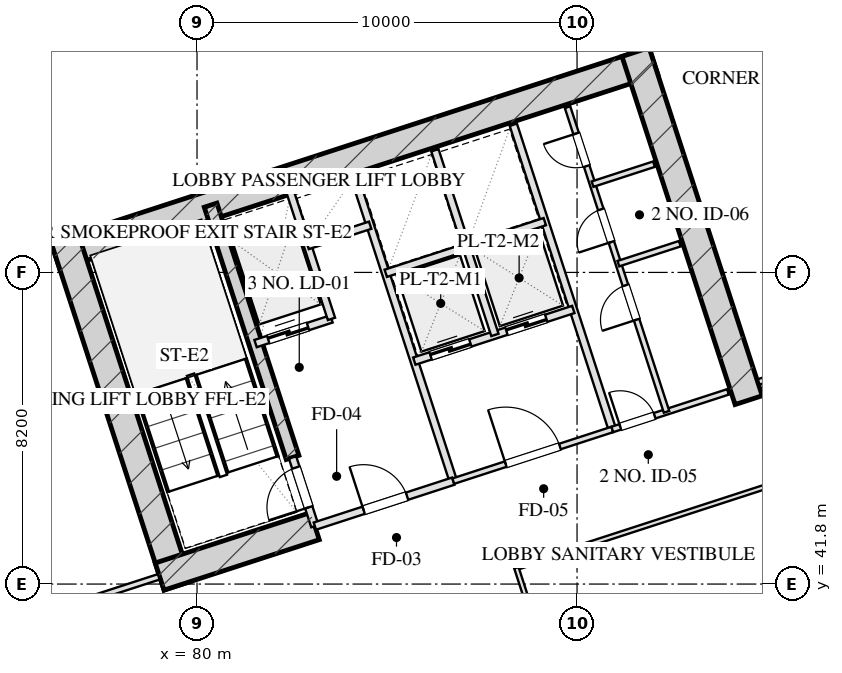
"""IFC4 building model, lengths in metres.
Left out: names, types, materials, properties, quantities, classifications, styles, units other than length and angle.
Written with IfcOpenShell. Run it as: python <this file> out.ifc"""

import sys

from ifc_helpers import new_model, si_unit, direction, frame, frame_2d, origin, place, context, subcontext, project, spatial, rectangle, extrude, element, fill, save


model = new_model("IFC4")
c1 = context("Model", 3, precision=1e-05, world=origin(), true_north=direction((0.0, 1.0)))
c2 = subcontext(c1, "Body", "Model", "MODEL_VIEW")
j1 = project(units=[si_unit("LENGTHUNIT", "METRE"), si_unit("PLANEANGLEUNIT", "RADIAN")], contexts=[c1])
p1 = place(None, origin())
s1 = spatial("IfcSite", under=j1, at=p1, CompositionType="ELEMENT")
p2 = place(p1, origin())
s2 = spatial("IfcBuilding", under=s1, at=p2, CompositionType="ELEMENT")
p3 = place(p2, frame((0.0, 0.0, 60.95)))
s3 = spatial("IfcBuildingStorey", under=s2, at=p3, CompositionType="ELEMENT", Elevation=60.95)
p4 = place(p3, frame((76.272, 50.443, 0.0), z_axis=(0.0, 0.0, 1.0), x_axis=(0.951056072937, 0.309018358888, 0.0)))
e1 = element("IfcWall", 1, at=p4, inside=s3, PredefinedType="SHEAR", context=c2, shape_type="SweptSolid", body=[
    extrude(rectangle(XDim=16.55, YDim=0.75, at=frame_2d((8.275, 0.0))), origin(), (0.0, 0.0, 1.0), 3.45),
])
for number, where, z_axis, x_axis in (
    (2, (79.489, 41.756, 0.0), (0.0, 0.0, 1.0), (-0.309, 0.951, 0.0)),
    (3, (94.515, 46.639, 0.0), (0.0, 0.0, 1.0), (-0.309, 0.951, 0.0)),
):
    element("IfcWall", number, at=place(p3, frame(where, z_axis=z_axis, x_axis=x_axis)), inside=s3, PredefinedType="SHEAR", context=c2, shape_type="SweptSolid", body=[
        extrude(rectangle(XDim=9.63, YDim=0.75, at=frame_2d((4.815, 0.0))), origin(), (0.0, 0.0, 1.0), 3.45),
    ])
p5 = place(p3, frame((82.514, 45.131, 0.0), z_axis=(0.0, 0.0, 1.0), x_axis=(-0.308988790936, 0.951065679686, 0.0)))
e4 = element("IfcWall", 4, at=p5, inside=s3, PredefinedType="SHEAR", context=c2, shape_type="SweptSolid", body=[
    extrude(rectangle(XDim=6.98, YDim=0.35, at=frame_2d((3.49, 0.0))), origin(), (0.0, 0.0, 1.0), 3.45),
])
p6 = place(p3, frame((79.016, 41.997, 0.0), z_axis=(0.0, 0.0, 1.0), x_axis=(0.95106038264, 0.309005094736, 0.0)))
e5 = element("IfcWall", 5, at=p6, inside=s3, PredefinedType="SHEAR", context=c2, shape_type="SweptSolid", body=[
    extrude(rectangle(XDim=4.295, YDim=0.75, at=frame_2d((2.147, 0.0))), origin(), (0.0, 0.0, 1.0), 3.45),
])
p7 = place(p3, frame((79.655, 4.352, 0.0), z_axis=(0.0, 0.0, 1.0), x_axis=(-0.309014526607, 0.951057318118, 0.0)))
e6 = element("IfcWall", 6, at=p7, inside=s3, PredefinedType="SOLIDWALL", context=c2, shape_type="SweptSolid", body=[
    extrude(rectangle(XDim=50.0, YDim=0.4, at=frame_2d((25.0, 0.0))), origin(), (0.0, 0.0, 1.0), 2.61),
])
p8 = place(p7, frame((30.15, 0.0, 0.75)))
e7 = element("IfcOpeningElement", 7, at=p8, cuts=e6, PredefinedType="OPENING", context=c2, shape_type="SweptSolid", body=[
    extrude(rectangle(XDim=2.5, YDim=1.46, at=frame_2d((1.25, 0.73))), frame((0.0, 0.21, 0.0), z_axis=(0.0, -1.0, 0.0), x_axis=(1.0, 0.0, 0.0)), (0.0, 0.0, 1.0), 0.42),
])
p9 = place(p7, frame((18.65, 0.0, 0.0)))
e8 = element("IfcOpeningElement", 8, at=p9, cuts=e6, PredefinedType="OPENING", context=c2, shape_type="SweptSolid", body=[
    extrude(rectangle(XDim=1.1, YDim=2.15, at=frame_2d((0.55, 1.075))), frame((0.0, 0.21, 0.0), z_axis=(0.0, -1.0, 0.0), x_axis=(1.0, 0.0, 0.0)), (0.0, 0.0, 1.0), 0.42),
])
p10 = place(p3, frame((66.002, 55.433, 0.0), z_axis=(0.0, 0.0, 1.0), x_axis=(0.951055939317, 0.309018770125, 0.0)))
e9 = element("IfcWall", 9, at=p10, inside=s3, PredefinedType="SOLIDWALL", context=c2, shape_type="SweptSolid", body=[
    extrude(rectangle(XDim=32.4, YDim=0.4, at=frame_2d((16.2, 0.0))), origin(), (0.0, 0.0, 1.0), 2.61),
])
p11 = place(p3, frame((83.101, 43.324, 0.0), z_axis=(0.0, 0.0, 1.0), x_axis=(-0.309048298632, 0.951046344356, 0.0)))
e10 = element("IfcWall", 10, at=p11, inside=s3, PredefinedType="PARTITIONING", context=c2, shape_type="SweptSolid", body=[
    extrude(rectangle(XDim=1.9, YDim=0.2, at=frame_2d((0.95, 0.0))), origin(), (0.0, 0.0, 1.0), 3.175),
])
p12 = place(p11, frame((0.52, 0.0, 0.0)))
e11 = element("IfcOpeningElement", 11, at=p12, cuts=e10, PredefinedType="OPENING", context=c2, shape_type="SweptSolid", body=[
    extrude(rectangle(XDim=1.1, YDim=2.05, at=frame_2d((0.55, 1.025))), frame((0.0, 0.11, 0.0), z_axis=(0.0, -1.0, 0.0), x_axis=(1.0, 0.0, 0.0)), (0.0, 0.0, 1.0), 0.22),
])
p13 = place(p3, frame((86.743, 44.508, 0.0), z_axis=(0.0, 0.0, 1.0), x_axis=(-0.309016001439, 0.951056838919, 0.0)))
e12 = element("IfcWall", 12, at=p13, inside=s3, PredefinedType="PARTITIONING", context=c2, shape_type="SweptSolid", body=[
    extrude(rectangle(XDim=8.43, YDim=0.2, at=frame_2d((4.215, 0.0))), origin(), (0.0, 0.0, 1.0), 3.175),
])
p14 = place(p3, frame((83.101, 43.324, 0.0), z_axis=(0.0, 0.0, 1.0), x_axis=(0.951052804469, 0.309028417967, 0.0)))
e13 = element("IfcWall", 13, at=p14, inside=s3, PredefinedType="PARTITIONING", context=c2, shape_type="SweptSolid", body=[
    extrude(rectangle(XDim=3.83, YDim=0.2, at=frame_2d((1.915, 0.0))), origin(), (0.0, 0.0, 1.0), 3.175),
])
p15 = place(p14, frame((1.35, 0.0, 0.0)))
e14 = element("IfcOpeningElement", 14, at=p15, cuts=e13, PredefinedType="OPENING", context=c2, shape_type="SweptSolid", body=[
    extrude(rectangle(XDim=1.2, YDim=2.05, at=frame_2d((0.6, 1.025))), frame((0.0, 0.11, 0.0), z_axis=(0.0, -1.0, 0.0), x_axis=(1.0, 0.0, 0.0)), (0.0, 0.0, 1.0), 0.22),
])
p16 = place(p3, frame((81.54, 48.127, 0.0), z_axis=(0.0, 0.0, 1.0), x_axis=(0.951062257173, 0.308999325213, 0.0)))
e15 = element("IfcWall", 15, at=p16, inside=s3, PredefinedType="PARTITIONING", context=c2, shape_type="SweptSolid", body=[
    extrude(rectangle(XDim=2.1, YDim=0.2, at=frame_2d((1.05, 0.0))), origin(), (0.0, 0.0, 1.0), 3.175),
])
p17 = place(p16, frame((0.35, 0.0, 0.0)))
e16 = element("IfcOpeningElement", 16, at=p17, cuts=e15, PredefinedType="OPENING", context=c2, shape_type="SweptSolid", body=[
    extrude(rectangle(XDim=1.1, YDim=2.05, at=frame_2d((0.55, 1.025))), frame((0.0, 0.11, 0.0), z_axis=(0.0, -1.0, 0.0), x_axis=(1.0, 0.0, 0.0)), (0.0, 0.0, 1.0), 0.22),
])
p18 = place(p3, frame((83.538, 48.776, 0.0), z_axis=(0.0, 0.0, 1.0), x_axis=(-0.3089935693, 0.951064127245, 0.0)))
e17 = element("IfcWall", 17, at=p18, inside=s3, PredefinedType="PARTITIONING", context=c2, shape_type="SweptSolid", body=[
    extrude(rectangle(XDim=3.7, YDim=0.2, at=frame_2d((1.85, 0.0))), origin(), (0.0, 0.0, 1.0), 3.175),
])
p19 = place(p3, frame((82.91, 50.707, 0.0), z_axis=(0.0, 0.0, 1.0), x_axis=(0.951041328149, 0.309063734775, 0.0)))
e18 = element("IfcWall", 18, at=p19, inside=s3, PredefinedType="PARTITIONING", context=c2, shape_type="SweptSolid", body=[
    extrude(rectangle(XDim=1.73, YDim=0.2, at=frame_2d((0.865, 0.0))), origin(), (0.0, 0.0, 1.0), 3.175),
])
p20 = place(p3, frame((90.928, 45.868, 0.0), z_axis=(0.0, 0.0, 1.0), x_axis=(-0.309042196757, 0.951048327176, 0.0)))
e19 = element("IfcWall", 19, at=p20, inside=s3, PredefinedType="PARTITIONING", context=c2, shape_type="SweptSolid", body=[
    extrude(rectangle(XDim=8.43, YDim=0.2, at=frame_2d((4.215, 0.0))), origin(), (0.0, 0.0, 1.0), 3.175),
])
p21 = place(p3, frame((86.743, 44.508, 0.0), z_axis=(0.0, 0.0, 1.0), x_axis=(0.951063829732, 0.308994485023, 0.0)))
e20 = element("IfcWall", 20, at=p21, inside=s3, PredefinedType="PARTITIONING", context=c2, shape_type="SweptSolid", body=[
    extrude(rectangle(XDim=4.4, YDim=0.15, at=frame_2d((2.2, 0.0))), origin(), (0.0, 0.0, 1.0), 3.175),
])
p22 = place(p21, frame((1.45, 0.0, 0.0)))
e21 = element("IfcOpeningElement", 21, at=p22, cuts=e20, PredefinedType="OPENING", context=c2, shape_type="SweptSolid", body=[
    extrude(rectangle(XDim=1.5, YDim=2.05, at=frame_2d((0.75, 1.025))), frame((0.0, 0.085, 0.0), z_axis=(0.0, -1.0, 0.0), x_axis=(1.0, 0.0, 0.0)), (0.0, 0.0, 1.0), 0.17),
])
p23 = place(p3, frame((85.718, 47.666, 0.0), z_axis=(0.0, 0.0, 1.0), x_axis=(0.951058531764, 0.30901079133, 0.0)))
e22 = element("IfcWall", 22, at=p23, inside=s3, PredefinedType="PARTITIONING", context=c2, shape_type="SweptSolid", body=[
    extrude(rectangle(XDim=4.4, YDim=0.2, at=frame_2d((2.2, 0.0))), origin(), (0.0, 0.0, 1.0), 3.175),
])
p24 = place(p23, frame((0.45, 0.0, 0.0)))
e23 = element("IfcOpeningElement", 23, at=p24, cuts=e22, PredefinedType="OPENING", context=c2, shape_type="SweptSolid", body=[
    extrude(rectangle(XDim=1.1, YDim=2.05, at=frame_2d((0.55, 1.025))), frame((0.0, 0.11, 0.0), z_axis=(0.0, -1.0, 0.0), x_axis=(1.0, 0.0, 0.0)), (0.0, 0.0, 1.0), 0.22),
])
p25 = place(p23, frame((2.55, 0.0, 0.0)))
e24 = element("IfcOpeningElement", 24, at=p25, cuts=e22, PredefinedType="OPENING", context=c2, shape_type="SweptSolid", body=[
    extrude(rectangle(XDim=1.1, YDim=2.05, at=frame_2d((0.55, 1.025))), frame((0.0, 0.11, 0.0), z_axis=(0.0, -1.0, 0.0), x_axis=(1.0, 0.0, 0.0)), (0.0, 0.0, 1.0), 0.22),
])
p26 = place(p3, frame((87.838, 48.354, 0.0), z_axis=(0.0, 0.0, 1.0), x_axis=(-0.3090093719, 0.951058992953, 0.0)))
e25 = element("IfcWall", 25, at=p26, inside=s3, PredefinedType="PARTITIONING", context=c2, shape_type="SweptSolid", body=[
    extrude(rectangle(XDim=5.11, YDim=0.2, at=frame_2d((2.555, 0.0))), origin(), (0.0, 0.0, 1.0), 3.175),
])
p27 = place(p3, frame((84.967, 49.977, 0.0), z_axis=(0.0, 0.0, 1.0), x_axis=(0.951063829732, 0.308994485023, 0.0)))
e26 = element("IfcWall", 26, at=p27, inside=s3, PredefinedType="PARTITIONING", context=c2, shape_type="SweptSolid", body=[
    extrude(rectangle(XDim=4.4, YDim=0.2, at=frame_2d((2.2, 0.0))), origin(), (0.0, 0.0, 1.0), 3.175),
])
p28 = place(p3, frame((90.928, 45.868, 0.0), z_axis=(0.0, 0.0, 1.0), x_axis=(0.951059297078, 0.309008435874, 0.0)))
e27 = element("IfcWall", 27, at=p28, inside=s3, PredefinedType="PARTITIONING", context=c2, shape_type="SweptSolid", body=[
    extrude(rectangle(XDim=3.2, YDim=0.15, at=frame_2d((1.6, 0.0))), origin(), (0.0, 0.0, 1.0), 3.175),
])
p29 = place(p28, frame((0.22, 0.0, 0.0)))
e28 = element("IfcOpeningElement", 28, at=p29, cuts=e27, PredefinedType="OPENING", context=c2, shape_type="SweptSolid", body=[
    extrude(rectangle(XDim=0.95, YDim=2.05, at=frame_2d((0.475, 1.025))), frame((0.0, 0.085, 0.0), z_axis=(0.0, -1.0, 0.0), x_axis=(1.0, 0.0, 0.0)), (0.0, 0.0, 1.0), 0.17),
])
p30 = place(p3, frame((92.355, 46.331, 0.0), z_axis=(0.0, 0.0, 1.0), x_axis=(-0.309007490203, 0.951059604335, 0.0)))
e29 = element("IfcWall", 29, at=p30, inside=s3, PredefinedType="PARTITIONING", context=c2, shape_type="SweptSolid", body=[
    extrude(rectangle(XDim=8.43, YDim=0.15, at=frame_2d((4.215, 0.0))), origin(), (0.0, 0.0, 1.0), 3.175),
])
p31 = place(p30, frame((2.55, 0.0, 0.0)))
e30 = element("IfcOpeningElement", 30, at=p31, cuts=e29, PredefinedType="OPENING", context=c2, shape_type="SweptSolid", body=[
    extrude(rectangle(XDim=0.95, YDim=2.05, at=frame_2d((0.475, 1.025))), frame((0.0, 0.085, 0.0), z_axis=(0.0, -1.0, 0.0), x_axis=(1.0, 0.0, 0.0)), (0.0, 0.0, 1.0), 0.17),
])
p32 = place(p30, frame((4.7, 0.0, 0.0)))
e31 = element("IfcOpeningElement", 31, at=p32, cuts=e29, PredefinedType="OPENING", context=c2, shape_type="SweptSolid", body=[
    extrude(rectangle(XDim=0.9, YDim=2.05, at=frame_2d((0.45, 1.025))), frame((0.0, 0.085, 0.0), z_axis=(0.0, -1.0, 0.0), x_axis=(1.0, 0.0, 0.0)), (0.0, 0.0, 1.0), 0.17),
])
p33 = place(p30, frame((6.8, 0.0, 0.0)))
e32 = element("IfcOpeningElement", 32, at=p33, cuts=e29, PredefinedType="OPENING", context=c2, shape_type="SweptSolid", body=[
    extrude(rectangle(XDim=0.9, YDim=2.05, at=frame_2d((0.45, 1.025))), frame((0.0, 0.085, 0.0), z_axis=(0.0, -1.0, 0.0), x_axis=(1.0, 0.0, 0.0)), (0.0, 0.0, 1.0), 0.17),
])
p34 = place(p3, frame((91.088, 50.23, 0.0), z_axis=(0.0, 0.0, 1.0), x_axis=(0.951054116971, 0.309024378638, 0.0)))
e33 = element("IfcWall", 33, at=p34, inside=s3, PredefinedType="PARTITIONING", context=c2, shape_type="SweptSolid", body=[
    extrude(rectangle(XDim=1.7, YDim=0.15, at=frame_2d((0.85, 0.0))), origin(), (0.0, 0.0, 1.0), 3.175),
])
p35 = place(p3, frame((90.408, 52.323, 0.0), z_axis=(0.0, 0.0, 1.0), x_axis=(0.951040401051, 0.309066587596, 0.0)))
e34 = element("IfcWall", 34, at=p35, inside=s3, PredefinedType="PARTITIONING", context=c2, shape_type="SweptSolid", body=[
    extrude(rectangle(XDim=1.7, YDim=0.15, at=frame_2d((0.85, 0.0))), origin(), (0.0, 0.0, 1.0), 3.175),
])
p36 = place(p3, frame((68.721, 38.652, 0.0), z_axis=(0.0, 0.0, 1.0), x_axis=(0.951056658866, 0.309016555588, 0.0)))
e35 = element("IfcWall", 35, at=p36, inside=s3, PredefinedType="PARTITIONING", context=c2, shape_type="SweptSolid", body=[
    extrude(rectangle(XDim=10.8, YDim=0.15, at=frame_2d((5.4, 0.0))), origin(), (0.0, 0.0, 1.0), 3.175),
])
p37 = place(p36, frame((4.536, 0.0, 0.0)))
e36 = element("IfcOpeningElement", 36, at=p37, cuts=e35, PredefinedType="OPENING", context=c2, shape_type="SweptSolid", body=[
    extrude(rectangle(XDim=1.0, YDim=2.05, at=frame_2d((0.5, 1.025))), frame((0.0, 0.085, 0.0), z_axis=(0.0, -1.0, 0.0), x_axis=(1.0, 0.0, 0.0)), (0.0, 0.0, 1.0), 0.17),
])
p38 = place(p3, frame((94.78, 47.119, 0.0), z_axis=(0.0, 0.0, 1.0), x_axis=(0.951054294345, 0.309023832749, 0.0)))
e37 = element("IfcWall", 37, at=p38, inside=s3, PredefinedType="PARTITIONING", context=c2, shape_type="SweptSolid", body=[
    extrude(rectangle(XDim=10.2, YDim=0.15, at=frame_2d((5.1, 0.0))), origin(), (0.0, 0.0, 1.0), 3.175),
])
p39 = place(p38, frame((4.284, 0.0, 0.0)))
e38 = element("IfcOpeningElement", 38, at=p39, cuts=e37, PredefinedType="OPENING", context=c2, shape_type="SweptSolid", body=[
    extrude(rectangle(XDim=1.05, YDim=2.05, at=frame_2d((0.525, 1.025))), frame((0.0, 0.085, 0.0), z_axis=(0.0, -1.0, 0.0), x_axis=(1.0, 0.0, 0.0)), (0.0, 0.0, 1.0), 0.17),
])
p40 = place(p3, frame((88.404, 42.229, 0.0), z_axis=(0.0, 0.0, 1.0), x_axis=(0.951054152931, 0.309024267966, 0.0)))
e39 = element("IfcWall", 39, at=p40, inside=s3, PredefinedType="PARTITIONING", context=c2, shape_type="SweptSolid", body=[
    extrude(rectangle(XDim=17.775, YDim=0.12, at=frame_2d((8.888, 0.0))), origin(), (0.0, 0.0, 1.0), 3.175),
])
p41 = place(p3, frame((93.546, 26.404, 0.0), z_axis=(0.0, 0.0, 1.0), x_axis=(-0.309022042254, 0.951054876125, 0.0)))
e40 = element("IfcWall", 40, at=p41, inside=s3, PredefinedType="PARTITIONING", context=c2, shape_type="SweptSolid", body=[
    extrude(rectangle(XDim=16.64, YDim=0.12, at=frame_2d((8.32, 0.0))), origin(), (0.0, 0.0, 1.0), 3.175),
])
p42 = place(p41, frame((1.16, 0.0, 0.0)))
e41 = element("IfcOpeningElement", 41, at=p42, cuts=e40, PredefinedType="OPENING", context=c2, shape_type="SweptSolid", body=[
    extrude(rectangle(XDim=1.0, YDim=2.05, at=frame_2d((0.5, 1.025))), frame((0.0, 0.07, 0.0), z_axis=(0.0, -1.0, 0.0), x_axis=(1.0, 0.0, 0.0)), (0.0, 0.0, 1.0), 0.14),
])
p43 = place(p41, frame((4.72, 0.0, 0.0)))
e42 = element("IfcOpeningElement", 42, at=p43, cuts=e40, PredefinedType="OPENING", context=c2, shape_type="SweptSolid", body=[
    extrude(rectangle(XDim=0.85, YDim=2.05, at=frame_2d((0.425, 1.025))), frame((0.0, 0.07, 0.0), z_axis=(0.0, -1.0, 0.0), x_axis=(1.0, 0.0, 0.0)), (0.0, 0.0, 1.0), 0.14),
])
p44 = place(p41, frame((7.549, 0.0, 0.0)))
e43 = element("IfcOpeningElement", 43, at=p44, cuts=e40, PredefinedType="OPENING", context=c2, shape_type="SweptSolid", body=[
    extrude(rectangle(XDim=1.0, YDim=2.05, at=frame_2d((0.5, 1.025))), frame((0.0, 0.07, 0.0), z_axis=(0.0, -1.0, 0.0), x_axis=(1.0, 0.0, 0.0)), (0.0, 0.0, 1.0), 0.14),
])
p45 = place(p41, frame((10.148, 0.0, 0.0)))
e44 = element("IfcOpeningElement", 44, at=p45, cuts=e40, PredefinedType="OPENING", context=c2, shape_type="SweptSolid", body=[
    extrude(rectangle(XDim=1.05, YDim=2.05, at=frame_2d((0.525, 1.025))), frame((0.0, 0.07, 0.0), z_axis=(0.0, -1.0, 0.0), x_axis=(1.0, 0.0, 0.0)), (0.0, 0.0, 1.0), 0.14),
])
p46 = place(p41, frame((14.48, 0.0, 0.0)))
e45 = element("IfcOpeningElement", 45, at=p46, cuts=e40, PredefinedType="OPENING", context=c2, shape_type="SweptSolid", body=[
    extrude(rectangle(XDim=1.0, YDim=2.05, at=frame_2d((0.5, 1.025))), frame((0.0, 0.07, 0.0), z_axis=(0.0, -1.0, 0.0), x_axis=(1.0, 0.0, 0.0)), (0.0, 0.0, 1.0), 0.14),
])
p47 = place(p3, frame((89.43, 39.072, 0.0), z_axis=(0.0, 0.0, 1.0), x_axis=(0.951058189574, 0.309011844505, 0.0)))
e46 = element("IfcWall", 46, at=p47, inside=s3, PredefinedType="PARTITIONING", context=c2, shape_type="SweptSolid", body=[
    extrude(rectangle(XDim=17.775, YDim=0.12, at=frame_2d((8.887, 0.0))), origin(), (0.0, 0.0, 1.0), 3.175),
])
p48 = place(p12, origin())
e47 = element("IfcDoor", 47, at=p48, inside=s3, OperationType="SINGLE_SWING_LEFT", PredefinedType="DOOR", context=c2, shape_type="SweptSolid", body=[
    extrude(rectangle(XDim=1.1, YDim=2.05, at=frame_2d((0.55, 1.025))), frame((0.0, 0.025, 0.0), z_axis=(0.0, -1.0, 0.0), x_axis=(1.0, 0.0, 0.0)), (0.0, 0.0, 1.0), 0.05),
])
fill(e11, e47)
p49 = place(p15, origin())
e48 = element("IfcDoor", 48, at=p49, inside=s3, OperationType="SINGLE_SWING_LEFT", PredefinedType="DOOR", context=c2, shape_type="SweptSolid", body=[
    extrude(rectangle(XDim=1.2, YDim=2.05, at=frame_2d((0.6, 1.025))), frame((0.0, 0.025, 0.0), z_axis=(0.0, -1.0, 0.0), x_axis=(1.0, 0.0, 0.0)), (0.0, 0.0, 1.0), 0.05),
])
fill(e14, e48)
p50 = place(p17, origin())
e49 = element("IfcDoor", 49, at=p50, inside=s3, OperationType="DOUBLE_DOOR_SLIDING", PredefinedType="DOOR", context=c2, shape_type="SweptSolid", body=[
    extrude(rectangle(XDim=1.1, YDim=2.05, at=frame_2d((0.55, 1.025))), frame((0.0, 0.025, 0.0), z_axis=(0.0, -1.0, 0.0), x_axis=(1.0, 0.0, 0.0)), (0.0, 0.0, 1.0), 0.05),
])
fill(e16, e49)
p51 = place(p22, origin())
e50 = element("IfcDoor", 50, at=p51, inside=s3, OperationType="SINGLE_SWING_LEFT", PredefinedType="DOOR", context=c2, shape_type="SweptSolid", body=[
    extrude(rectangle(XDim=1.5, YDim=2.05, at=frame_2d((0.75, 1.025))), frame((0.0, 0.025, 0.0), z_axis=(0.0, -1.0, 0.0), x_axis=(1.0, 0.0, 0.0)), (0.0, 0.0, 1.0), 0.05),
])
fill(e21, e50)
p52 = place(p24, origin())
e51 = element("IfcDoor", 51, at=p52, inside=s3, OperationType="DOUBLE_DOOR_SLIDING", PredefinedType="DOOR", context=c2, shape_type="SweptSolid", body=[
    extrude(rectangle(XDim=1.1, YDim=2.05, at=frame_2d((0.55, 1.025))), frame((0.0, 0.025, 0.0), z_axis=(0.0, -1.0, 0.0), x_axis=(1.0, 0.0, 0.0)), (0.0, 0.0, 1.0), 0.05),
])
fill(e23, e51)
p53 = place(p25, origin())
e52 = element("IfcDoor", 52, at=p53, inside=s3, OperationType="DOUBLE_DOOR_SLIDING", PredefinedType="DOOR", context=c2, shape_type="SweptSolid", body=[
    extrude(rectangle(XDim=1.1, YDim=2.05, at=frame_2d((0.55, 1.025))), frame((0.0, 0.025, 0.0), z_axis=(0.0, -1.0, 0.0), x_axis=(1.0, 0.0, 0.0)), (0.0, 0.0, 1.0), 0.05),
])
fill(e24, e52)
p54 = place(p29, origin())
e53 = element("IfcDoor", 53, at=p54, inside=s3, OperationType="SINGLE_SWING_LEFT", PredefinedType="DOOR", context=c2, shape_type="SweptSolid", body=[
    extrude(rectangle(XDim=0.95, YDim=2.05, at=frame_2d((0.475, 1.025))), frame((0.0, 0.025, 0.0), z_axis=(0.0, -1.0, 0.0), x_axis=(1.0, 0.0, 0.0)), (0.0, 0.0, 1.0), 0.05),
])
fill(e28, e53)
p55 = place(p31, origin())
e54 = element("IfcDoor", 54, at=p55, inside=s3, OperationType="SINGLE_SWING_LEFT", PredefinedType="DOOR", context=c2, shape_type="SweptSolid", body=[
    extrude(rectangle(XDim=0.95, YDim=2.05, at=frame_2d((0.475, 1.025))), frame((0.0, 0.025, 0.0), z_axis=(0.0, -1.0, 0.0), x_axis=(1.0, 0.0, 0.0)), (0.0, 0.0, 1.0), 0.05),
])
fill(e30, e54)
p56 = place(p32, origin())
e55 = element("IfcDoor", 55, at=p56, inside=s3, OperationType="SINGLE_SWING_LEFT", PredefinedType="DOOR", context=c2, shape_type="SweptSolid", body=[
    extrude(rectangle(XDim=0.9, YDim=2.05, at=frame_2d((0.45, 1.025))), frame((0.0, 0.025, 0.0), z_axis=(0.0, -1.0, 0.0), x_axis=(1.0, 0.0, 0.0)), (0.0, 0.0, 1.0), 0.05),
])
fill(e31, e55)
p57 = place(p33, origin())
e56 = element("IfcDoor", 56, at=p57, inside=s3, OperationType="SINGLE_SWING_RIGHT", PredefinedType="DOOR", context=c2, shape_type="SweptSolid", body=[
    extrude(rectangle(XDim=0.9, YDim=2.05, at=frame_2d((0.45, 1.025))), frame((0.0, 0.025, 0.0), z_axis=(0.0, -1.0, 0.0), x_axis=(1.0, 0.0, 0.0)), (0.0, 0.0, 1.0), 0.05),
])
fill(e32, e56)
save(model, sys.argv[1])
